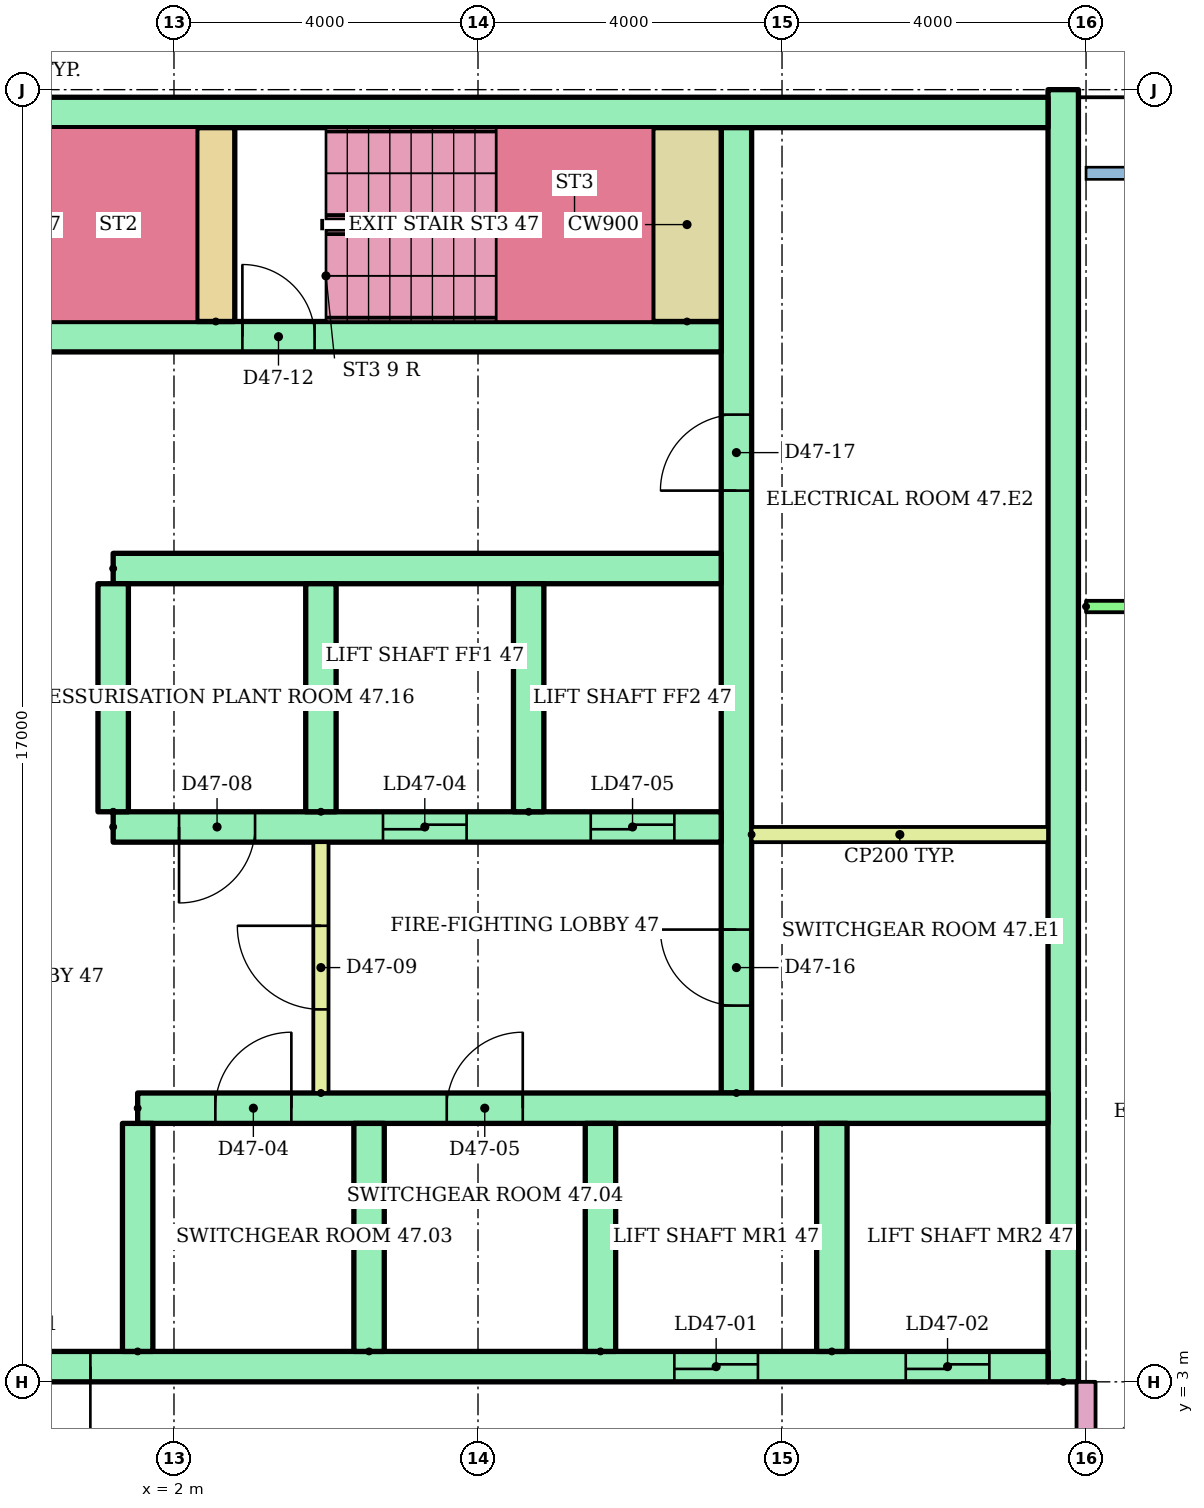
"""IFC4 building model, lengths in metres.
Left out: names, types, materials, properties, quantities, classifications, styles, units other than length and angle.
Written with IfcOpenShell. Run it as: python <this file> out.ifc"""

import sys

from ifc_helpers import new_model, si_unit, direction, frame, frame_2d, origin, place, context, subcontext, project, spatial, rectangle, extrude, element, fill, save


model = new_model("IFC4")
c1 = context("Model", 3, precision=1e-05, world=origin(), true_north=direction((0.0, 1.0)))
c2 = subcontext(c1, "Body", "Model", "MODEL_VIEW")
j1 = project(units=[si_unit("LENGTHUNIT", "METRE"), si_unit("PLANEANGLEUNIT", "RADIAN")], contexts=[c1])
p1 = place(None, origin())
s1 = spatial("IfcSite", under=j1, at=p1, CompositionType="ELEMENT")
p2 = place(p1, origin())
s2 = spatial("IfcBuilding", under=s1, at=p2, CompositionType="ELEMENT")
p3 = place(p2, frame((0.0, 0.0, 181.3)))
s3 = spatial("IfcBuildingStorey", under=s2, at=p3, CompositionType="ELEMENT", Elevation=181.3)
p4 = place(p3, frame((13.7, 3.0, 0.0), z_axis=(0.0, 0.0, 1.0), x_axis=(0.0, 1.0, 0.0)))
e1 = element("IfcWall", 1, at=p4, inside=s3, PredefinedType="SHEAR", context=c2, shape_type="SweptSolid", body=[
    extrude(rectangle(XDim=17.0, YDim=0.4, at=frame_2d((8.5, 0.0))), origin(), (0.0, 0.0, 1.0), 2.92),
])
p5 = place(p3, frame((-13.5, 19.7, 0.0)))
e2 = element("IfcWall", 2, at=p5, inside=s3, PredefinedType="SHEAR", context=c2, shape_type="SweptSolid", body=[
    extrude(rectangle(XDim=27.0, YDim=0.4, at=frame_2d((13.5, 0.0))), origin(), (0.0, 0.0, 1.0), 2.92),
])
p6 = place(p3, frame((9.4, 6.8, 0.0), z_axis=(0.0, 0.0, 1.0), x_axis=(0.0, 1.0, 0.0)))
e3 = element("IfcWall", 3, at=p6, inside=s3, PredefinedType="SHEAR", context=c2, shape_type="SweptSolid", body=[
    extrude(rectangle(XDim=12.7, YDim=0.4, at=frame_2d((6.35, 0.0))), origin(), (0.0, 0.0, 1.0), 2.92),
])
p7 = place(p6, frame((1.15, 0.0, 0.0)))
e4 = element("IfcOpeningElement", 4, at=p7, cuts=e3, PredefinedType="OPENING", context=c2, shape_type="SweptSolid", body=[
    extrude(rectangle(XDim=1.0, YDim=2.1, at=frame_2d((0.5, 1.05))), frame((0.0, 0.21, 0.0), z_axis=(0.0, -1.0, 0.0), x_axis=(1.0, 0.0, 0.0)), (0.0, 0.0, 1.0), 0.42),
])
p8 = place(p6, frame((7.925, 0.0, 0.0)))
e5 = element("IfcOpeningElement", 5, at=p8, cuts=e3, PredefinedType="OPENING", context=c2, shape_type="SweptSolid", body=[
    extrude(rectangle(XDim=1.0, YDim=2.1, at=frame_2d((0.5, 1.05))), frame((0.0, 0.21, 0.0), z_axis=(0.0, -1.0, 0.0), x_axis=(1.0, 0.0, 0.0)), (0.0, 0.0, 1.0), 0.42),
])
p9 = place(p3, frame((-13.5, 3.2, 0.0)))
e6 = element("IfcWall", 6, at=p9, inside=s3, PredefinedType="SHEAR", context=c2, shape_type="SweptSolid", body=[
    extrude(rectangle(XDim=27.0, YDim=0.4, at=frame_2d((13.5, 0.0))), origin(), (0.0, 0.0, 1.0), 2.92),
])
p10 = place(p9, frame((22.083, 0.0, 0.0)))
e7 = element("IfcOpeningElement", 7, at=p10, cuts=e6, PredefinedType="OPENING", context=c2, shape_type="SweptSolid", body=[
    extrude(rectangle(XDim=1.1, YDim=2.1, at=frame_2d((0.55, 1.05))), frame((0.0, 0.21, 0.0), z_axis=(0.0, -1.0, 0.0), x_axis=(1.0, 0.0, 0.0)), (0.0, 0.0, 1.0), 0.42),
])
p11 = place(p9, frame((25.128, 0.0, 0.0)))
e8 = element("IfcOpeningElement", 8, at=p11, cuts=e6, PredefinedType="OPENING", context=c2, shape_type="SweptSolid", body=[
    extrude(rectangle(XDim=1.1, YDim=2.1, at=frame_2d((0.55, 1.05))), frame((0.0, 0.21, 0.0), z_axis=(0.0, -1.0, 0.0), x_axis=(1.0, 0.0, 0.0)), (0.0, 0.0, 1.0), 0.42),
])
p12 = place(p9, frame((12.6, 0.0, 0.0)))
e9 = element("IfcOpeningElement", 9, at=p12, cuts=e6, PredefinedType="OPENING", context=c2, shape_type="SweptSolid", body=[
    extrude(rectangle(XDim=1.8, YDim=2.1, at=frame_2d((0.9, 1.05))), frame((0.0, 0.21, 0.0), z_axis=(0.0, -1.0, 0.0), x_axis=(1.0, 0.0, 0.0)), (0.0, 0.0, 1.0), 0.42),
])
p13 = place(p3, frame((1.522, 6.6, 0.0)))
e10 = element("IfcWall", 10, at=p13, inside=s3, PredefinedType="SHEAR", context=c2, shape_type="SweptSolid", body=[
    extrude(rectangle(XDim=11.978, YDim=0.4, at=frame_2d((5.989, 0.0))), origin(), (0.0, 0.0, 1.0), 2.92),
])
p14 = place(p13, frame((1.022, 0.0, 0.0)))
e11 = element("IfcOpeningElement", 11, at=p14, cuts=e10, PredefinedType="OPENING", context=c2, shape_type="SweptSolid", body=[
    extrude(rectangle(XDim=1.0, YDim=2.1, at=frame_2d((0.5, 1.05))), frame((0.0, 0.21, 0.0), z_axis=(0.0, -1.0, 0.0), x_axis=(1.0, 0.0, 0.0)), (0.0, 0.0, 1.0), 0.42),
])
p15 = place(p13, frame((4.067, 0.0, 0.0)))
e12 = element("IfcOpeningElement", 12, at=p15, cuts=e10, PredefinedType="OPENING", context=c2, shape_type="SweptSolid", body=[
    extrude(rectangle(XDim=1.0, YDim=2.1, at=frame_2d((0.5, 1.05))), frame((0.0, 0.21, 0.0), z_axis=(0.0, -1.0, 0.0), x_axis=(1.0, 0.0, 0.0)), (0.0, 0.0, 1.0), 0.42),
])
for number, where, z_axis, x_axis in (
    (13, (1.522, 3.4, 0.0), (0.0, 0.0, 1.0), (0.0, 1.0, 0.0)),
    (14, (4.567, 3.4, 0.0), (0.0, 0.0, 1.0), (0.0, 1.0, 0.0)),
    (15, (7.611, 3.4, 0.0), (0.0, 0.0, 1.0), (0.0, 1.0, 0.0)),
    (16, (10.656, 3.4, 0.0), (0.0, 0.0, 1.0), (0.0, 1.0, 0.0)),
):
    element("IfcWall", number, at=place(p3, frame(where, z_axis=z_axis, x_axis=x_axis)), inside=s3, PredefinedType="SHEAR", context=c2, shape_type="SweptSolid", body=[
        extrude(rectangle(XDim=3.0, YDim=0.4, at=frame_2d((1.5, 0.0))), origin(), (0.0, 0.0, 1.0), 2.92),
    ])
p16 = place(p3, frame((1.2, 10.3, 0.0)))
e17 = element("IfcWall", 17, at=p16, inside=s3, PredefinedType="SHEAR", context=c2, shape_type="SweptSolid", body=[
    extrude(rectangle(XDim=8.0, YDim=0.4, at=frame_2d((4.0, 0.0))), origin(), (0.0, 0.0, 1.0), 2.92),
])
p17 = place(p16, frame((3.55, 0.0, 0.0)))
e18 = element("IfcOpeningElement", 18, at=p17, cuts=e17, PredefinedType="OPENING", context=c2, shape_type="SweptSolid", body=[
    extrude(rectangle(XDim=1.1, YDim=2.1, at=frame_2d((0.55, 1.05))), frame((0.0, 0.21, 0.0), z_axis=(0.0, -1.0, 0.0), x_axis=(1.0, 0.0, 0.0)), (0.0, 0.0, 1.0), 0.42),
])
p18 = place(p16, frame((6.283, 0.0, 0.0)))
e19 = element("IfcOpeningElement", 19, at=p18, cuts=e17, PredefinedType="OPENING", context=c2, shape_type="SweptSolid", body=[
    extrude(rectangle(XDim=1.1, YDim=2.1, at=frame_2d((0.55, 1.05))), frame((0.0, 0.21, 0.0), z_axis=(0.0, -1.0, 0.0), x_axis=(1.0, 0.0, 0.0)), (0.0, 0.0, 1.0), 0.42),
])
p19 = place(p16, frame((0.867, 0.0, 0.0)))
e20 = element("IfcOpeningElement", 20, at=p19, cuts=e17, PredefinedType="OPENING", context=c2, shape_type="SweptSolid", body=[
    extrude(rectangle(XDim=1.0, YDim=2.1, at=frame_2d((0.5, 1.05))), frame((0.0, 0.21, 0.0), z_axis=(0.0, -1.0, 0.0), x_axis=(1.0, 0.0, 0.0)), (0.0, 0.0, 1.0), 0.42),
])
p20 = place(p3, frame((1.2, 13.7, 0.0)))
e21 = element("IfcWall", 21, at=p20, inside=s3, PredefinedType="SHEAR", context=c2, shape_type="SweptSolid", body=[
    extrude(rectangle(XDim=8.0, YDim=0.4, at=frame_2d((4.0, 0.0))), origin(), (0.0, 0.0, 1.0), 2.92),
])
for number, where, z_axis, x_axis in (
    (22, (1.2, 10.5, 0.0), (0.0, 0.0, 1.0), (0.0, 1.0, 0.0)),
    (23, (3.933, 10.5, 0.0), (0.0, 0.0, 1.0), (0.0, 1.0, 0.0)),
    (24, (6.667, 10.5, 0.0), (0.0, 0.0, 1.0), (0.0, 1.0, 0.0)),
):
    element("IfcWall", number, at=place(p3, frame(where, z_axis=z_axis, x_axis=x_axis)), inside=s3, PredefinedType="SHEAR", context=c2, shape_type="SweptSolid", body=[
        extrude(rectangle(XDim=3.0, YDim=0.4, at=frame_2d((1.5, 0.0))), origin(), (0.0, 0.0, 1.0), 2.92),
    ])
p21 = place(p3, frame((3.933, 6.8, 0.0), z_axis=(0.0, 0.0, 1.0), x_axis=(0.0, 1.0, 0.0)))
e25 = element("IfcWall", 25, at=p21, inside=s3, PredefinedType="PARTITIONING", context=c2, shape_type="SweptSolid", body=[
    extrude(rectangle(XDim=3.3, YDim=0.2, at=frame_2d((1.65, 0.0))), origin(), (0.0, 0.0, 1.0), 2.92),
])
p22 = place(p21, frame((1.1, 0.0, 0.0)))
e26 = element("IfcOpeningElement", 26, at=p22, cuts=e25, PredefinedType="OPENING", context=c2, shape_type="SweptSolid", body=[
    extrude(rectangle(XDim=1.1, YDim=2.1, at=frame_2d((0.55, 1.05))), frame((0.0, 0.11, 0.0), z_axis=(0.0, -1.0, 0.0), x_axis=(1.0, 0.0, 0.0)), (0.0, 0.0, 1.0), 0.22),
])
p23 = place(p3, frame((-9.2, 16.75, 0.0)))
e27 = element("IfcWall", 27, at=p23, inside=s3, PredefinedType="SHEAR", context=c2, shape_type="SweptSolid", body=[
    extrude(rectangle(XDim=18.4, YDim=0.4, at=frame_2d((9.2, 0.0))), origin(), (0.0, 0.0, 1.0), 2.92),
])
p24 = place(p23, frame((0.1, 0.0, 0.0)))
e28 = element("IfcOpeningElement", 28, at=p24, cuts=e27, PredefinedType="OPENING", context=c2, shape_type="SweptSolid", body=[
    extrude(rectangle(XDim=0.95, YDim=2.1, at=frame_2d((0.475, 1.05))), frame((0.0, 0.21, 0.0), z_axis=(0.0, -1.0, 0.0), x_axis=(1.0, 0.0, 0.0)), (0.0, 0.0, 1.0), 0.42),
])
p25 = place(p23, frame((6.1, 0.0, 0.0)))
e29 = element("IfcOpeningElement", 29, at=p25, cuts=e27, PredefinedType="OPENING", context=c2, shape_type="SweptSolid", body=[
    extrude(rectangle(XDim=0.95, YDim=2.1, at=frame_2d((0.475, 1.05))), frame((0.0, 0.21, 0.0), z_axis=(0.0, -1.0, 0.0), x_axis=(1.0, 0.0, 0.0)), (0.0, 0.0, 1.0), 0.42),
])
p26 = place(p23, frame((12.1, 0.0, 0.0)))
e30 = element("IfcOpeningElement", 30, at=p26, cuts=e27, PredefinedType="OPENING", context=c2, shape_type="SweptSolid", body=[
    extrude(rectangle(XDim=0.95, YDim=2.1, at=frame_2d((0.475, 1.05))), frame((0.0, 0.21, 0.0), z_axis=(0.0, -1.0, 0.0), x_axis=(1.0, 0.0, 0.0)), (0.0, 0.0, 1.0), 0.42),
])
p27 = place(p3, frame((2.55, 16.95, 0.0), z_axis=(0.0, 0.0, 1.0), x_axis=(0.0, 1.0, 0.0)))
e31 = element("IfcWall", 31, at=p27, inside=s3, PredefinedType="SHEAR", context=c2, shape_type="SweptSolid", body=[
    extrude(rectangle(XDim=2.55, YDim=0.5, at=frame_2d((1.275, 0.0))), origin(), (0.0, 0.0, 1.0), 2.92),
])
p28 = place(p3, frame((8.75, 16.95, 0.0), z_axis=(0.0, 0.0, 1.0), x_axis=(0.0, 1.0, 0.0)))
e32 = element("IfcWall", 32, at=p28, inside=s3, PredefinedType="SHEAR", context=c2, shape_type="SweptSolid", body=[
    extrude(rectangle(XDim=2.55, YDim=0.9, at=frame_2d((1.275, 0.0))), origin(), (0.0, 0.0, 1.0), 2.92),
])
p29 = place(p3, frame((9.6, 10.2, 0.0)))
e33 = element("IfcWall", 33, at=p29, inside=s3, PredefinedType="PARTITIONING", context=c2, shape_type="SweptSolid", body=[
    extrude(rectangle(XDim=3.9, YDim=0.2, at=frame_2d((1.95, 0.0))), origin(), (0.0, 0.0, 1.0), 2.92),
])
p30 = place(p3, frame((14.0, 13.2, 0.0)))
e34 = element("IfcWall", 34, at=p30, inside=s3, PredefinedType="PARTITIONING", context=c2, shape_type="SweptSolid", body=[
    extrude(rectangle(XDim=22.82, YDim=0.15, at=frame_2d((11.41, 0.0))), origin(), (0.0, 0.0, 1.0), 2.4),
])
p31 = place(p30, frame((1.5, 0.0, 0.0)))
e35 = element("IfcOpeningElement", 35, at=p31, cuts=e34, PredefinedType="OPENING", context=c2, shape_type="SweptSolid", body=[
    extrude(rectangle(XDim=1.0, YDim=2.1, at=frame_2d((0.5, 1.05))), frame((0.0, 0.085, 0.0), z_axis=(0.0, -1.0, 0.0), x_axis=(1.0, 0.0, 0.0)), (0.0, 0.0, 1.0), 0.17),
])
p32 = place(p30, frame((7.55, 0.0, 0.0)))
e36 = element("IfcOpeningElement", 36, at=p32, cuts=e34, PredefinedType="OPENING", context=c2, shape_type="SweptSolid", body=[
    extrude(rectangle(XDim=0.9, YDim=2.1, at=frame_2d((0.45, 1.05))), frame((0.0, 0.085, 0.0), z_axis=(0.0, -1.0, 0.0), x_axis=(1.0, 0.0, 0.0)), (0.0, 0.0, 1.0), 0.17),
])
p33 = place(p30, frame((14.6, 0.0, 0.0)))
e37 = element("IfcOpeningElement", 37, at=p33, cuts=e34, PredefinedType="OPENING", context=c2, shape_type="SweptSolid", body=[
    extrude(rectangle(XDim=0.9, YDim=2.1, at=frame_2d((0.45, 1.05))), frame((0.0, 0.085, 0.0), z_axis=(0.0, -1.0, 0.0), x_axis=(1.0, 0.0, 0.0)), (0.0, 0.0, 1.0), 0.17),
])
p34 = place(p30, frame((19.9, 0.0, 0.0)))
e38 = element("IfcOpeningElement", 38, at=p34, cuts=e34, PredefinedType="OPENING", context=c2, shape_type="SweptSolid", body=[
    extrude(rectangle(XDim=0.9, YDim=2.1, at=frame_2d((0.45, 1.05))), frame((0.0, 0.085, 0.0), z_axis=(0.0, -1.0, 0.0), x_axis=(1.0, 0.0, 0.0)), (0.0, 0.0, 1.0), 0.17),
])
p35 = place(p3, frame((14.0, 1.4, 0.0), z_axis=(0.0, 0.0, 1.0), x_axis=(0.0, 1.0, 0.0)))
e39 = element("IfcWall", 39, at=p35, inside=s3, PredefinedType="PARTITIONING", context=c2, shape_type="SweptSolid", body=[
    extrude(rectangle(XDim=1.6, YDim=0.25, at=frame_2d((0.8, 0.0))), origin(), (0.0, 0.0, 1.0), 2.4),
])
p36 = place(p10, origin())
e40 = element("IfcDoor", 40, at=p36, inside=s3, OperationType="SLIDING_TO_LEFT", PredefinedType="DOOR", context=c2, shape_type="SweptSolid", body=[
    extrude(rectangle(XDim=1.1, YDim=2.1, at=frame_2d((0.55, 1.05))), frame((0.0, 0.025, 0.0), z_axis=(0.0, -1.0, 0.0), x_axis=(1.0, 0.0, 0.0)), (0.0, 0.0, 1.0), 0.05),
])
fill(e7, e40)
p37 = place(p11, origin())
e41 = element("IfcDoor", 41, at=p37, inside=s3, OperationType="SLIDING_TO_LEFT", PredefinedType="DOOR", context=c2, shape_type="SweptSolid", body=[
    extrude(rectangle(XDim=1.1, YDim=2.1, at=frame_2d((0.55, 1.05))), frame((0.0, 0.025, 0.0), z_axis=(0.0, -1.0, 0.0), x_axis=(1.0, 0.0, 0.0)), (0.0, 0.0, 1.0), 0.05),
])
fill(e8, e41)
p38 = place(p12, frame((1.8, 0.0, 0.0), z_axis=(0.0, 0.0, 1.0), x_axis=(-1.0, 0.0, 0.0)))
e42 = element("IfcDoor", 42, at=p38, inside=s3, OperationType="DOUBLE_DOOR_SINGLE_SWING", PredefinedType="DOOR", context=c2, shape_type="SweptSolid", body=[
    extrude(rectangle(XDim=1.8, YDim=2.1, at=frame_2d((0.9, 1.05))), frame((0.0, 0.025, 0.0), z_axis=(0.0, -1.0, 0.0), x_axis=(1.0, 0.0, 0.0)), (0.0, 0.0, 1.0), 0.05),
])
fill(e9, e42)
p39 = place(p14, origin())
e43 = element("IfcDoor", 43, at=p39, inside=s3, OperationType="SINGLE_SWING_RIGHT", PredefinedType="DOOR", context=c2, shape_type="SweptSolid", body=[
    extrude(rectangle(XDim=1.0, YDim=2.1, at=frame_2d((0.5, 1.05))), frame((0.0, 0.025, 0.0), z_axis=(0.0, -1.0, 0.0), x_axis=(1.0, 0.0, 0.0)), (0.0, 0.0, 1.0), 0.05),
])
fill(e11, e43)
p40 = place(p15, origin())
e44 = element("IfcDoor", 44, at=p40, inside=s3, OperationType="SINGLE_SWING_RIGHT", PredefinedType="DOOR", context=c2, shape_type="SweptSolid", body=[
    extrude(rectangle(XDim=1.0, YDim=2.1, at=frame_2d((0.5, 1.05))), frame((0.0, 0.025, 0.0), z_axis=(0.0, -1.0, 0.0), x_axis=(1.0, 0.0, 0.0)), (0.0, 0.0, 1.0), 0.05),
])
fill(e12, e44)
p41 = place(p17, origin())
e45 = element("IfcDoor", 45, at=p41, inside=s3, OperationType="SLIDING_TO_LEFT", PredefinedType="DOOR", context=c2, shape_type="SweptSolid", body=[
    extrude(rectangle(XDim=1.1, YDim=2.1, at=frame_2d((0.55, 1.05))), frame((0.0, 0.025, 0.0), z_axis=(0.0, -1.0, 0.0), x_axis=(1.0, 0.0, 0.0)), (0.0, 0.0, 1.0), 0.05),
])
fill(e18, e45)
p42 = place(p18, origin())
e46 = element("IfcDoor", 46, at=p42, inside=s3, OperationType="SLIDING_TO_LEFT", PredefinedType="DOOR", context=c2, shape_type="SweptSolid", body=[
    extrude(rectangle(XDim=1.1, YDim=2.1, at=frame_2d((0.55, 1.05))), frame((0.0, 0.025, 0.0), z_axis=(0.0, -1.0, 0.0), x_axis=(1.0, 0.0, 0.0)), (0.0, 0.0, 1.0), 0.05),
])
fill(e19, e46)
p43 = place(p19, frame((1.0, 0.0, 0.0), z_axis=(0.0, 0.0, 1.0), x_axis=(-1.0, 0.0, 0.0)))
e47 = element("IfcDoor", 47, at=p43, inside=s3, OperationType="SINGLE_SWING_LEFT", PredefinedType="DOOR", context=c2, shape_type="SweptSolid", body=[
    extrude(rectangle(XDim=1.0, YDim=2.1, at=frame_2d((0.5, 1.05))), frame((0.0, 0.025, 0.0), z_axis=(0.0, -1.0, 0.0), x_axis=(1.0, 0.0, 0.0)), (0.0, 0.0, 1.0), 0.05),
])
fill(e20, e47)
p44 = place(p22, origin())
e48 = element("IfcDoor", 48, at=p44, inside=s3, OperationType="SINGLE_SWING_RIGHT", PredefinedType="DOOR", context=c2, shape_type="SweptSolid", body=[
    extrude(rectangle(XDim=1.1, YDim=2.1, at=frame_2d((0.55, 1.05))), frame((0.0, 0.025, 0.0), z_axis=(0.0, -1.0, 0.0), x_axis=(1.0, 0.0, 0.0)), (0.0, 0.0, 1.0), 0.05),
])
fill(e26, e48)
p45 = place(p26, origin())
e49 = element("IfcDoor", 49, at=p45, inside=s3, OperationType="SINGLE_SWING_LEFT", PredefinedType="DOOR", context=c2, shape_type="SweptSolid", body=[
    extrude(rectangle(XDim=0.95, YDim=2.1, at=frame_2d((0.475, 1.05))), frame((0.0, 0.025, 0.0), z_axis=(0.0, -1.0, 0.0), x_axis=(1.0, 0.0, 0.0)), (0.0, 0.0, 1.0), 0.05),
])
fill(e30, e49)
p46 = place(p7, origin())
e50 = element("IfcDoor", 50, at=p46, inside=s3, OperationType="SINGLE_SWING_RIGHT", PredefinedType="DOOR", context=c2, shape_type="SweptSolid", body=[
    extrude(rectangle(XDim=1.0, YDim=2.1, at=frame_2d((0.5, 1.05))), frame((0.0, 0.025, 0.0), z_axis=(0.0, -1.0, 0.0), x_axis=(1.0, 0.0, 0.0)), (0.0, 0.0, 1.0), 0.05),
])
fill(e4, e50)
p47 = place(p8, origin())
e51 = element("IfcDoor", 51, at=p47, inside=s3, OperationType="SINGLE_SWING_LEFT", PredefinedType="DOOR", context=c2, shape_type="SweptSolid", body=[
    extrude(rectangle(XDim=1.0, YDim=2.1, at=frame_2d((0.5, 1.05))), frame((0.0, 0.025, 0.0), z_axis=(0.0, -1.0, 0.0), x_axis=(1.0, 0.0, 0.0)), (0.0, 0.0, 1.0), 0.05),
])
fill(e5, e51)
save(model, sys.argv[1])
